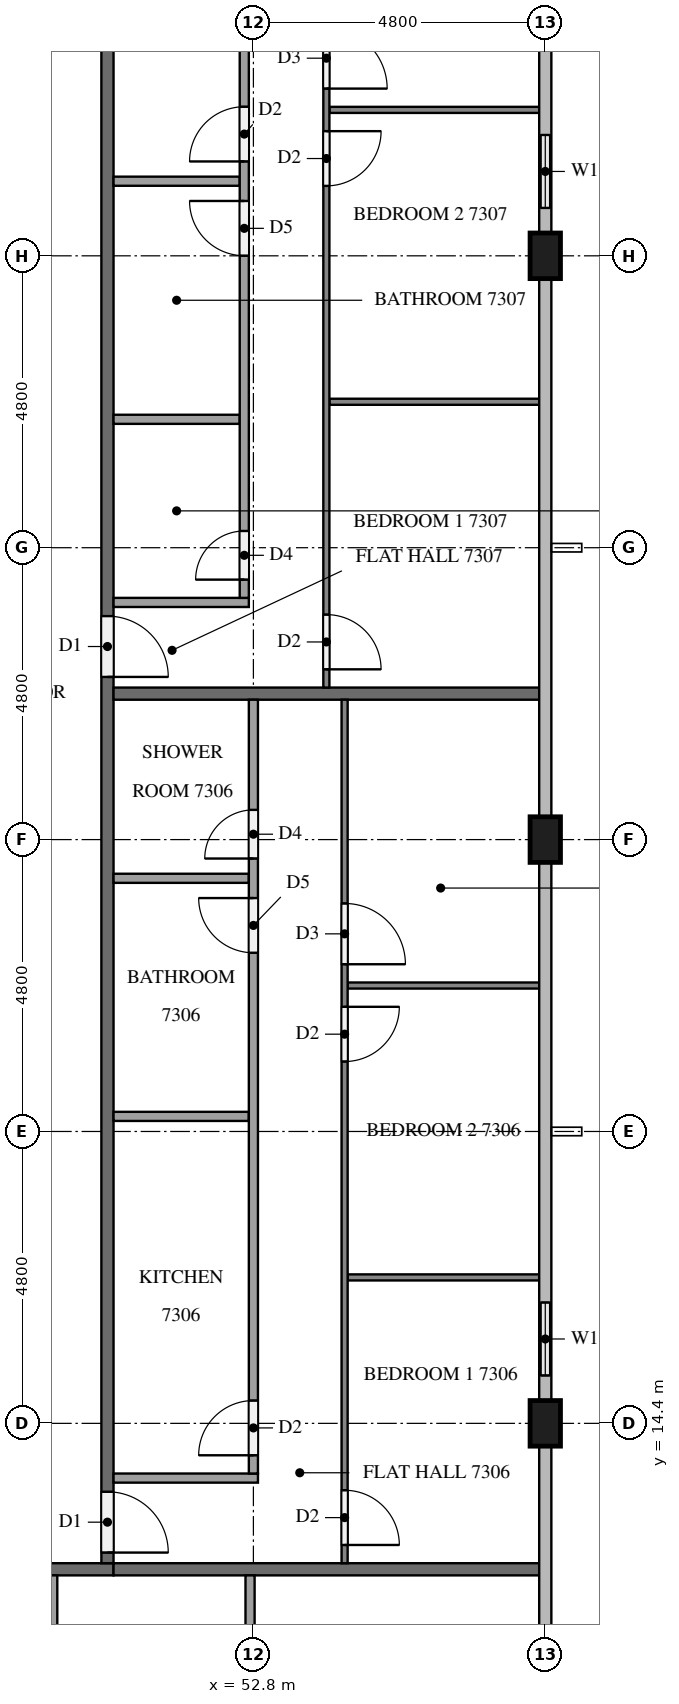
"""IFC4 building model, lengths in metres.
Left out: names, types, materials, properties, quantities, classifications, styles, units other than length and angle.
Written with IfcOpenShell. Run it as: python <this file> out.ifc"""

import sys

from ifc_helpers import new_model, si_unit, direction, frame, frame_2d, origin, origin_2d, place, context, subcontext, project, spatial, rectangle, extrude, element, fill, save


model = new_model("IFC4")
c1 = context("Model", 3, precision=1e-05, world=origin(), true_north=direction((0.0, 1.0)))
c2 = subcontext(c1, "Body", "Model", "MODEL_VIEW")
j1 = project(units=[si_unit("LENGTHUNIT", "METRE"), si_unit("PLANEANGLEUNIT", "RADIAN")], contexts=[c1])
p1 = place(None, origin())
s1 = spatial("IfcSite", under=j1, at=p1, CompositionType="ELEMENT")
p2 = place(p1, origin())
s2 = spatial("IfcBuilding", under=s1, at=p2, CompositionType="ELEMENT")
p3 = place(p2, frame((0.0, 0.0, 279.1)))
s3 = spatial("IfcBuildingStorey", under=s2, at=p3, CompositionType="ELEMENT", Elevation=279.1)
for number, where, z_axis, x_axis in (
    (1, (57.6, 14.4, 0.0), (0.0, 0.0, 1.0), (0.0, 1.0, 0.0)),
    (2, (57.6, 24.0, 0.0), (0.0, 0.0, 1.0), (0.0, 1.0, 0.0)),
    (3, (57.6, 33.6, 0.0), (0.0, 0.0, 1.0), (0.0, 1.0, 0.0)),
):
    element("IfcColumn", number, at=place(p3, frame(where, z_axis=z_axis, x_axis=x_axis)), inside=s3, PredefinedType="COLUMN", context=c2, shape_type="SweptSolid", body=[
        extrude(rectangle(XDim=0.75, YDim=0.5, at=origin_2d()), origin(), (0.0, 0.0, 1.0), 3.2),
    ])
p4 = place(p3, frame((57.6, 14.775, 0.0), z_axis=(0.0, 0.0, 1.0), x_axis=(0.0, 1.0, 0.0)))
e4 = element("IfcWall", 4, at=p4, inside=s3, PredefinedType="SOLIDWALL", context=c2, shape_type="SweptSolid", body=[
    extrude(rectangle(XDim=2.025, YDim=0.15, at=frame_2d((1.013, 0.0))), origin(), (0.0, 0.0, 1.0), 3.2),
])
p5 = place(p4, frame((0.413, 0.0, 0.9)))
e5 = element("IfcOpeningElement", 5, at=p5, cuts=e4, PredefinedType="OPENING", context=c2, shape_type="SweptSolid", body=[
    extrude(rectangle(XDim=1.2, YDim=1.4, at=frame_2d((0.6, 0.7))), frame((0.0, 0.085, 0.0), z_axis=(0.0, -1.0, 0.0), x_axis=(1.0, 0.0, 0.0)), (0.0, 0.0, 1.0), 0.17),
])
p6 = place(p3, frame((57.6, 33.975, 0.0), z_axis=(0.0, 0.0, 1.0), x_axis=(0.0, 1.0, 0.0)))
e6 = element("IfcWall", 6, at=p6, inside=s3, PredefinedType="SOLIDWALL", context=c2, shape_type="SweptSolid", body=[
    extrude(rectangle(XDim=2.025, YDim=0.15, at=frame_2d((1.012, 0.0))), origin(), (0.0, 0.0, 1.0), 3.2),
])
p7 = place(p6, frame((0.413, 0.0, 0.9)))
e7 = element("IfcOpeningElement", 7, at=p7, cuts=e6, PredefinedType="OPENING", context=c2, shape_type="SweptSolid", body=[
    extrude(rectangle(XDim=1.2, YDim=1.4, at=frame_2d((0.6, 0.7))), frame((0.0, 0.085, 0.0), z_axis=(0.0, -1.0, 0.0), x_axis=(1.0, 0.0, 0.0)), (0.0, 0.0, 1.0), 0.17),
])
p8 = place(p3, frame((50.5, 12.0, 0.0), z_axis=(0.0, 0.0, 1.0), x_axis=(-1.0, 0.0, 0.0)))
e8 = element("IfcWall", 8, at=p8, inside=s3, PredefinedType="PARTITIONING", context=c2, shape_type="SweptSolid", body=[
    extrude(rectangle(XDim=38.6, YDim=0.2, at=frame_2d((19.3, 0.0))), origin(), (0.0, 0.0, 1.0), 3.2),
])
p9 = place(p8, frame((36.375, 0.0, 0.0)))
e9 = element("IfcOpeningElement", 9, at=p9, cuts=e8, PredefinedType="OPENING", context=c2, shape_type="SweptSolid", body=[
    extrude(rectangle(XDim=1.0, YDim=2.1, at=frame_2d((0.5, 1.05))), frame((0.0, 0.11, 0.0), z_axis=(0.0, -1.0, 0.0), x_axis=(1.0, 0.0, 0.0)), (0.0, 0.0, 1.0), 0.22),
])
p10 = place(p8, frame((29.175, 0.0, 0.0)))
e10 = element("IfcOpeningElement", 10, at=p10, cuts=e8, PredefinedType="OPENING", context=c2, shape_type="SweptSolid", body=[
    extrude(rectangle(XDim=1.0, YDim=2.1, at=frame_2d((0.5, 1.05))), frame((0.0, 0.11, 0.0), z_axis=(0.0, -1.0, 0.0), x_axis=(1.0, 0.0, 0.0)), (0.0, 0.0, 1.0), 0.22),
])
p11 = place(p8, frame((27.625, 0.0, 0.0)))
e11 = element("IfcOpeningElement", 11, at=p11, cuts=e8, PredefinedType="OPENING", context=c2, shape_type="SweptSolid", body=[
    extrude(rectangle(XDim=1.0, YDim=2.1, at=frame_2d((0.5, 1.05))), frame((0.0, 0.11, 0.0), z_axis=(0.0, -1.0, 0.0), x_axis=(1.0, 0.0, 0.0)), (0.0, 0.0, 1.0), 0.22),
])
p12 = place(p8, frame((2.775, 0.0, 0.0)))
e12 = element("IfcOpeningElement", 12, at=p12, cuts=e8, PredefinedType="OPENING", context=c2, shape_type="SweptSolid", body=[
    extrude(rectangle(XDim=1.0, YDim=2.1, at=frame_2d((0.5, 1.05))), frame((0.0, 0.11, 0.0), z_axis=(0.0, -1.0, 0.0), x_axis=(1.0, 0.0, 0.0)), (0.0, 0.0, 1.0), 0.22),
])
p13 = place(p8, frame((1.225, 0.0, 0.0)))
e13 = element("IfcOpeningElement", 13, at=p13, cuts=e8, PredefinedType="OPENING", context=c2, shape_type="SweptSolid", body=[
    extrude(rectangle(XDim=1.0, YDim=2.1, at=frame_2d((0.5, 1.05))), frame((0.0, 0.11, 0.0), z_axis=(0.0, -1.0, 0.0), x_axis=(1.0, 0.0, 0.0)), (0.0, 0.0, 1.0), 0.22),
])
p14 = place(p3, frame((50.4, 40.7, 0.0), z_axis=(0.0, 0.0, 1.0), x_axis=(0.0, -1.0, 0.0)))
e14 = element("IfcWall", 14, at=p14, inside=s3, PredefinedType="PARTITIONING", context=c2, shape_type="SweptSolid", body=[
    extrude(rectangle(XDim=28.6, YDim=0.2, at=frame_2d((14.3, 0.0))), origin(), (0.0, 0.0, 1.0), 3.2),
])
p15 = place(p14, frame((27.425, 0.0, 0.0)))
e15 = element("IfcOpeningElement", 15, at=p15, cuts=e14, PredefinedType="OPENING", context=c2, shape_type="SweptSolid", body=[
    extrude(rectangle(XDim=1.0, YDim=2.1, at=frame_2d((0.5, 1.05))), frame((0.0, 0.11, 0.0), z_axis=(0.0, -1.0, 0.0), x_axis=(1.0, 0.0, 0.0)), (0.0, 0.0, 1.0), 0.22),
])
p16 = place(p14, frame((13.025, 0.0, 0.0)))
e16 = element("IfcOpeningElement", 16, at=p16, cuts=e14, PredefinedType="OPENING", context=c2, shape_type="SweptSolid", body=[
    extrude(rectangle(XDim=1.0, YDim=2.1, at=frame_2d((0.5, 1.05))), frame((0.0, 0.11, 0.0), z_axis=(0.0, -1.0, 0.0), x_axis=(1.0, 0.0, 0.0)), (0.0, 0.0, 1.0), 0.22),
])
for number, where, z_axis, x_axis in (
    (17, (50.5, 12.0, 0.0), (0.0, 0.0, 1.0), (1.0, 0.0, 0.0)),
    (18, (50.5, 26.4, 0.0), (0.0, 0.0, 1.0), (1.0, 0.0, 0.0)),
):
    element("IfcWall", number, at=place(p3, frame(where, z_axis=z_axis, x_axis=x_axis)), inside=s3, PredefinedType="PARTITIONING", context=c2, shape_type="SweptSolid", body=[
        extrude(rectangle(XDim=7.0, YDim=0.2, at=frame_2d((3.5, 0.0))), origin(), (0.0, 0.0, 1.0), 3.2),
    ])
p17 = place(p3, frame((52.745, 11.9, 0.0), z_axis=(0.0, 0.0, 1.0), x_axis=(0.0, -1.0, 0.0)))
e19 = element("IfcWall", 19, at=p17, inside=s3, PredefinedType="PARTITIONING", context=c2, shape_type="SweptSolid", body=[
    extrude(rectangle(XDim=3.575, YDim=0.15, at=frame_2d((1.788, 0.0))), origin(), (0.0, 0.0, 1.0), 3.2),
])
p18 = place(p3, frame((49.5, 11.9, 0.0), z_axis=(0.0, 0.0, 1.0), x_axis=(0.0, -1.0, 0.0)))
e20 = element("IfcWall", 20, at=p18, inside=s3, PredefinedType="PARTITIONING", context=c2, shape_type="SweptSolid", body=[
    extrude(rectangle(XDim=3.725, YDim=0.15, at=frame_2d((1.862, 0.0))), origin(), (0.0, 0.0, 1.0), 3.2),
])
for number, where, z_axis, x_axis in (
    (21, (54.35, 16.8, 0.0), (0.0, 0.0, 1.0), (1.0, 0.0, 0.0)),
    (22, (54.35, 21.6, 0.0), (0.0, 0.0, 1.0), (1.0, 0.0, 0.0)),
):
    element("IfcWall", number, at=place(p3, frame(where, z_axis=z_axis, x_axis=x_axis)), inside=s3, PredefinedType="PARTITIONING", context=c2, shape_type="SweptSolid", body=[
        extrude(rectangle(XDim=3.15, YDim=0.1, at=frame_2d((1.575, 0.0))), origin(), (0.0, 0.0, 1.0), 3.2),
    ])
p19 = place(p3, frame((54.3, 26.3, 0.0), z_axis=(0.0, 0.0, 1.0), x_axis=(0.0, -1.0, 0.0)))
e23 = element("IfcWall", 23, at=p19, inside=s3, PredefinedType="PARTITIONING", context=c2, shape_type="SweptSolid", body=[
    extrude(rectangle(XDim=14.2, YDim=0.1, at=frame_2d((7.1, 0.0))), origin(), (0.0, 0.0, 1.0), 3.2),
])
p20 = place(p19, frame((13.0, 0.0, 0.0)))
e24 = element("IfcOpeningElement", 24, at=p20, cuts=e23, PredefinedType="OPENING", context=c2, shape_type="SweptSolid", body=[
    extrude(rectangle(XDim=0.9, YDim=2.1, at=frame_2d((0.45, 1.05))), frame((0.0, 0.06, 0.0), z_axis=(0.0, -1.0, 0.0), x_axis=(1.0, 0.0, 0.0)), (0.0, 0.0, 1.0), 0.12),
])
p21 = place(p19, frame((5.05, 0.0, 0.0)))
e25 = element("IfcOpeningElement", 25, at=p21, cuts=e23, PredefinedType="OPENING", context=c2, shape_type="SweptSolid", body=[
    extrude(rectangle(XDim=0.9, YDim=2.1, at=frame_2d((0.45, 1.05))), frame((0.0, 0.06, 0.0), z_axis=(0.0, -1.0, 0.0), x_axis=(1.0, 0.0, 0.0)), (0.0, 0.0, 1.0), 0.12),
])
p22 = place(p19, frame((3.35, 0.0, 0.0)))
e26 = element("IfcOpeningElement", 26, at=p22, cuts=e23, PredefinedType="OPENING", context=c2, shape_type="SweptSolid", body=[
    extrude(rectangle(XDim=1.0, YDim=2.1, at=frame_2d((0.5, 1.05))), frame((0.0, 0.06, 0.0), z_axis=(0.0, -1.0, 0.0), x_axis=(1.0, 0.0, 0.0)), (0.0, 0.0, 1.0), 0.12),
])
for number, where, z_axis, x_axis in (
    (27, (50.5, 19.448, 0.0), (0.0, 0.0, 1.0), (1.0, 0.0, 0.0)),
    (28, (50.5, 23.364, 0.0), (0.0, 0.0, 1.0), (1.0, 0.0, 0.0)),
):
    element("IfcWall", number, at=place(p3, frame(where, z_axis=z_axis, x_axis=x_axis)), inside=s3, PredefinedType="PARTITIONING", context=c2, shape_type="SweptSolid", body=[
        extrude(rectangle(XDim=2.225, YDim=0.15, at=frame_2d((1.113, 0.0))), origin(), (0.0, 0.0, 1.0), 3.2),
    ])
p23 = place(p3, frame((50.5, 13.5, 0.0), z_axis=(0.0, 0.0, 1.0), x_axis=(1.0, 0.0, 0.0)))
e29 = element("IfcWall", 29, at=p23, inside=s3, PredefinedType="PARTITIONING", context=c2, shape_type="SweptSolid", body=[
    extrude(rectangle(XDim=2.375, YDim=0.15, at=frame_2d((1.188, 0.0))), origin(), (0.0, 0.0, 1.0), 3.2),
])
p24 = place(p3, frame((52.8, 13.575, 0.0), z_axis=(0.0, 0.0, 1.0), x_axis=(0.0, 1.0, 0.0)))
e30 = element("IfcWall", 30, at=p24, inside=s3, PredefinedType="PARTITIONING", context=c2, shape_type="SweptSolid", body=[
    extrude(rectangle(XDim=12.725, YDim=0.15, at=frame_2d((6.363, 0.0))), origin(), (0.0, 0.0, 1.0), 3.2),
])
p25 = place(p24, frame((0.3, 0.0, 0.0)))
e31 = element("IfcOpeningElement", 31, at=p25, cuts=e30, PredefinedType="OPENING", context=c2, shape_type="SweptSolid", body=[
    extrude(rectangle(XDim=0.9, YDim=2.1, at=frame_2d((0.45, 1.05))), frame((0.0, 0.085, 0.0), z_axis=(0.0, -1.0, 0.0), x_axis=(1.0, 0.0, 0.0)), (0.0, 0.0, 1.0), 0.17),
])
p26 = place(p24, frame((8.563, 0.0, 0.0)))
e32 = element("IfcOpeningElement", 32, at=p26, cuts=e30, PredefinedType="OPENING", context=c2, shape_type="SweptSolid", body=[
    extrude(rectangle(XDim=0.9, YDim=2.1, at=frame_2d((0.45, 1.05))), frame((0.0, 0.085, 0.0), z_axis=(0.0, -1.0, 0.0), x_axis=(1.0, 0.0, 0.0)), (0.0, 0.0, 1.0), 0.17),
])
p27 = place(p24, frame((10.114, 0.0, 0.0)))
e33 = element("IfcOpeningElement", 33, at=p27, cuts=e30, PredefinedType="OPENING", context=c2, shape_type="SweptSolid", body=[
    extrude(rectangle(XDim=0.8, YDim=2.1, at=frame_2d((0.4, 1.05))), frame((0.0, 0.085, 0.0), z_axis=(0.0, -1.0, 0.0), x_axis=(1.0, 0.0, 0.0)), (0.0, 0.0, 1.0), 0.17),
])
for number, where, z_axis, x_axis in (
    (34, (54.05, 31.2, 0.0), (0.0, 0.0, 1.0), (1.0, 0.0, 0.0)),
    (35, (54.05, 36.0, 0.0), (0.0, 0.0, 1.0), (1.0, 0.0, 0.0)),
):
    element("IfcWall", number, at=place(p3, frame(where, z_axis=z_axis, x_axis=x_axis)), inside=s3, PredefinedType="PARTITIONING", context=c2, shape_type="SweptSolid", body=[
        extrude(rectangle(XDim=3.45, YDim=0.1, at=frame_2d((1.725, 0.0))), origin(), (0.0, 0.0, 1.0), 3.2),
    ])
p28 = place(p3, frame((54.0, 40.7, 0.0), z_axis=(0.0, 0.0, 1.0), x_axis=(0.0, -1.0, 0.0)))
e36 = element("IfcWall", 36, at=p28, inside=s3, PredefinedType="PARTITIONING", context=c2, shape_type="SweptSolid", body=[
    extrude(rectangle(XDim=14.2, YDim=0.1, at=frame_2d((7.1, 0.0))), origin(), (0.0, 0.0, 1.0), 3.2),
])
p29 = place(p28, frame((13.0, 0.0, 0.0)))
e37 = element("IfcOpeningElement", 37, at=p29, cuts=e36, PredefinedType="OPENING", context=c2, shape_type="SweptSolid", body=[
    extrude(rectangle(XDim=0.9, YDim=2.1, at=frame_2d((0.45, 1.05))), frame((0.0, 0.06, 0.0), z_axis=(0.0, -1.0, 0.0), x_axis=(1.0, 0.0, 0.0)), (0.0, 0.0, 1.0), 0.12),
])
p30 = place(p28, frame((5.05, 0.0, 0.0)))
e38 = element("IfcOpeningElement", 38, at=p30, cuts=e36, PredefinedType="OPENING", context=c2, shape_type="SweptSolid", body=[
    extrude(rectangle(XDim=0.9, YDim=2.1, at=frame_2d((0.45, 1.05))), frame((0.0, 0.06, 0.0), z_axis=(0.0, -1.0, 0.0), x_axis=(1.0, 0.0, 0.0)), (0.0, 0.0, 1.0), 0.12),
])
p31 = place(p28, frame((3.35, 0.0, 0.0)))
e39 = element("IfcOpeningElement", 39, at=p31, cuts=e36, PredefinedType="OPENING", context=c2, shape_type="SweptSolid", body=[
    extrude(rectangle(XDim=1.0, YDim=2.1, at=frame_2d((0.5, 1.05))), frame((0.0, 0.06, 0.0), z_axis=(0.0, -1.0, 0.0), x_axis=(1.0, 0.0, 0.0)), (0.0, 0.0, 1.0), 0.12),
])
for number, where, z_axis, x_axis in (
    (40, (50.5, 30.912, 0.0), (0.0, 0.0, 1.0), (1.0, 0.0, 0.0)),
    (41, (50.5, 34.827, 0.0), (0.0, 0.0, 1.0), (1.0, 0.0, 0.0)),
):
    element("IfcWall", number, at=place(p3, frame(where, z_axis=z_axis, x_axis=x_axis)), inside=s3, PredefinedType="PARTITIONING", context=c2, shape_type="SweptSolid", body=[
        extrude(rectangle(XDim=2.075, YDim=0.15, at=frame_2d((1.038, 0.0))), origin(), (0.0, 0.0, 1.0), 3.2),
    ])
p32 = place(p3, frame((50.5, 27.9, 0.0), z_axis=(0.0, 0.0, 1.0), x_axis=(1.0, 0.0, 0.0)))
e42 = element("IfcWall", 42, at=p32, inside=s3, PredefinedType="PARTITIONING", context=c2, shape_type="SweptSolid", body=[
    extrude(rectangle(XDim=2.225, YDim=0.15, at=frame_2d((1.113, 0.0))), origin(), (0.0, 0.0, 1.0), 3.2),
])
p33 = place(p3, frame((52.65, 27.975, 0.0), z_axis=(0.0, 0.0, 1.0), x_axis=(0.0, 1.0, 0.0)))
e43 = element("IfcWall", 43, at=p33, inside=s3, PredefinedType="PARTITIONING", context=c2, shape_type="SweptSolid", body=[
    extrude(rectangle(XDim=12.725, YDim=0.15, at=frame_2d((6.362, 0.0))), origin(), (0.0, 0.0, 1.0), 3.2),
])
p34 = place(p33, frame((0.3, 0.0, 0.0)))
e44 = element("IfcOpeningElement", 44, at=p34, cuts=e43, PredefinedType="OPENING", context=c2, shape_type="SweptSolid", body=[
    extrude(rectangle(XDim=0.8, YDim=2.1, at=frame_2d((0.4, 1.05))), frame((0.0, 0.085, 0.0), z_axis=(0.0, -1.0, 0.0), x_axis=(1.0, 0.0, 0.0)), (0.0, 0.0, 1.0), 0.17),
])
p35 = place(p33, frame((5.627, 0.0, 0.0)))
e45 = element("IfcOpeningElement", 45, at=p35, cuts=e43, PredefinedType="OPENING", context=c2, shape_type="SweptSolid", body=[
    extrude(rectangle(XDim=0.9, YDim=2.1, at=frame_2d((0.45, 1.05))), frame((0.0, 0.085, 0.0), z_axis=(0.0, -1.0, 0.0), x_axis=(1.0, 0.0, 0.0)), (0.0, 0.0, 1.0), 0.17),
])
p36 = place(p33, frame((7.177, 0.0, 0.0)))
e46 = element("IfcOpeningElement", 46, at=p36, cuts=e43, PredefinedType="OPENING", context=c2, shape_type="SweptSolid", body=[
    extrude(rectangle(XDim=0.9, YDim=2.1, at=frame_2d((0.45, 1.05))), frame((0.0, 0.085, 0.0), z_axis=(0.0, -1.0, 0.0), x_axis=(1.0, 0.0, 0.0)), (0.0, 0.0, 1.0), 0.17),
])
p37 = place(p5, origin())
e47 = element("IfcWindow", 47, at=p37, inside=s3, PartitioningType="SINGLE_PANEL", PredefinedType="WINDOW", context=c2, shape_type="SweptSolid", body=[
    extrude(rectangle(XDim=1.2, YDim=1.4, at=frame_2d((0.6, 0.7))), frame((0.0, 0.03, 0.0), z_axis=(0.0, -1.0, 0.0), x_axis=(1.0, 0.0, 0.0)), (0.0, 0.0, 1.0), 0.06),
])
fill(e5, e47)
p38 = place(p7, origin())
e48 = element("IfcWindow", 48, at=p38, inside=s3, PartitioningType="SINGLE_PANEL", PredefinedType="WINDOW", context=c2, shape_type="SweptSolid", body=[
    extrude(rectangle(XDim=1.2, YDim=1.4, at=frame_2d((0.6, 0.7))), frame((0.0, 0.03, 0.0), z_axis=(0.0, -1.0, 0.0), x_axis=(1.0, 0.0, 0.0)), (0.0, 0.0, 1.0), 0.06),
])
fill(e7, e48)
p39 = place(p15, origin())
e49 = element("IfcDoor", 49, at=p39, inside=s3, OperationType="SINGLE_SWING_RIGHT", PredefinedType="DOOR", context=c2, shape_type="SweptSolid", body=[
    extrude(rectangle(XDim=1.0, YDim=2.1, at=frame_2d((0.5, 1.05))), frame((0.0, 0.025, 0.0), z_axis=(0.0, -1.0, 0.0), x_axis=(1.0, 0.0, 0.0)), (0.0, 0.0, 1.0), 0.05),
])
fill(e15, e49)
p40 = place(p16, origin())
e50 = element("IfcDoor", 50, at=p40, inside=s3, OperationType="SINGLE_SWING_RIGHT", PredefinedType="DOOR", context=c2, shape_type="SweptSolid", body=[
    extrude(rectangle(XDim=1.0, YDim=2.1, at=frame_2d((0.5, 1.05))), frame((0.0, 0.025, 0.0), z_axis=(0.0, -1.0, 0.0), x_axis=(1.0, 0.0, 0.0)), (0.0, 0.0, 1.0), 0.05),
])
fill(e16, e50)
p41 = place(p20, origin())
e51 = element("IfcDoor", 51, at=p41, inside=s3, OperationType="SINGLE_SWING_RIGHT", PredefinedType="DOOR", context=c2, shape_type="SweptSolid", body=[
    extrude(rectangle(XDim=0.9, YDim=2.1, at=frame_2d((0.45, 1.05))), frame((0.0, 0.025, 0.0), z_axis=(0.0, -1.0, 0.0), x_axis=(1.0, 0.0, 0.0)), (0.0, 0.0, 1.0), 0.05),
])
fill(e24, e51)
p42 = place(p21, origin())
e52 = element("IfcDoor", 52, at=p42, inside=s3, OperationType="SINGLE_SWING_LEFT", PredefinedType="DOOR", context=c2, shape_type="SweptSolid", body=[
    extrude(rectangle(XDim=0.9, YDim=2.1, at=frame_2d((0.45, 1.05))), frame((0.0, 0.025, 0.0), z_axis=(0.0, -1.0, 0.0), x_axis=(1.0, 0.0, 0.0)), (0.0, 0.0, 1.0), 0.05),
])
fill(e25, e52)
p43 = place(p22, origin())
e53 = element("IfcDoor", 53, at=p43, inside=s3, OperationType="SINGLE_SWING_RIGHT", PredefinedType="DOOR", context=c2, shape_type="SweptSolid", body=[
    extrude(rectangle(XDim=1.0, YDim=2.1, at=frame_2d((0.5, 1.05))), frame((0.0, 0.025, 0.0), z_axis=(0.0, -1.0, 0.0), x_axis=(1.0, 0.0, 0.0)), (0.0, 0.0, 1.0), 0.05),
])
fill(e26, e53)
p44 = place(p25, origin())
e54 = element("IfcDoor", 54, at=p44, inside=s3, OperationType="SINGLE_SWING_LEFT", PredefinedType="DOOR", context=c2, shape_type="SweptSolid", body=[
    extrude(rectangle(XDim=0.9, YDim=2.1, at=frame_2d((0.45, 1.05))), frame((0.0, 0.025, 0.0), z_axis=(0.0, -1.0, 0.0), x_axis=(1.0, 0.0, 0.0)), (0.0, 0.0, 1.0), 0.05),
])
fill(e31, e54)
p45 = place(p26, origin())
e55 = element("IfcDoor", 55, at=p45, inside=s3, OperationType="SINGLE_SWING_RIGHT", PredefinedType="DOOR", context=c2, shape_type="SweptSolid", body=[
    extrude(rectangle(XDim=0.9, YDim=2.1, at=frame_2d((0.45, 1.05))), frame((0.0, 0.025, 0.0), z_axis=(0.0, -1.0, 0.0), x_axis=(1.0, 0.0, 0.0)), (0.0, 0.0, 1.0), 0.05),
])
fill(e32, e55)
p46 = place(p27, origin())
e56 = element("IfcDoor", 56, at=p46, inside=s3, OperationType="SINGLE_SWING_LEFT", PredefinedType="DOOR", context=c2, shape_type="SweptSolid", body=[
    extrude(rectangle(XDim=0.8, YDim=2.1, at=frame_2d((0.4, 1.05))), frame((0.0, 0.025, 0.0), z_axis=(0.0, -1.0, 0.0), x_axis=(1.0, 0.0, 0.0)), (0.0, 0.0, 1.0), 0.05),
])
fill(e33, e56)
p47 = place(p29, origin())
e57 = element("IfcDoor", 57, at=p47, inside=s3, OperationType="SINGLE_SWING_RIGHT", PredefinedType="DOOR", context=c2, shape_type="SweptSolid", body=[
    extrude(rectangle(XDim=0.9, YDim=2.1, at=frame_2d((0.45, 1.05))), frame((0.0, 0.025, 0.0), z_axis=(0.0, -1.0, 0.0), x_axis=(1.0, 0.0, 0.0)), (0.0, 0.0, 1.0), 0.05),
])
fill(e37, e57)
p48 = place(p30, origin())
e58 = element("IfcDoor", 58, at=p48, inside=s3, OperationType="SINGLE_SWING_LEFT", PredefinedType="DOOR", context=c2, shape_type="SweptSolid", body=[
    extrude(rectangle(XDim=0.9, YDim=2.1, at=frame_2d((0.45, 1.05))), frame((0.0, 0.025, 0.0), z_axis=(0.0, -1.0, 0.0), x_axis=(1.0, 0.0, 0.0)), (0.0, 0.0, 1.0), 0.05),
])
fill(e38, e58)
p49 = place(p31, origin())
e59 = element("IfcDoor", 59, at=p49, inside=s3, OperationType="SINGLE_SWING_RIGHT", PredefinedType="DOOR", context=c2, shape_type="SweptSolid", body=[
    extrude(rectangle(XDim=1.0, YDim=2.1, at=frame_2d((0.5, 1.05))), frame((0.0, 0.025, 0.0), z_axis=(0.0, -1.0, 0.0), x_axis=(1.0, 0.0, 0.0)), (0.0, 0.0, 1.0), 0.05),
])
fill(e39, e59)
p50 = place(p34, origin())
e60 = element("IfcDoor", 60, at=p50, inside=s3, OperationType="SINGLE_SWING_LEFT", PredefinedType="DOOR", context=c2, shape_type="SweptSolid", body=[
    extrude(rectangle(XDim=0.8, YDim=2.1, at=frame_2d((0.4, 1.05))), frame((0.0, 0.025, 0.0), z_axis=(0.0, -1.0, 0.0), x_axis=(1.0, 0.0, 0.0)), (0.0, 0.0, 1.0), 0.05),
])
fill(e44, e60)
p51 = place(p35, origin())
e61 = element("IfcDoor", 61, at=p51, inside=s3, OperationType="SINGLE_SWING_RIGHT", PredefinedType="DOOR", context=c2, shape_type="SweptSolid", body=[
    extrude(rectangle(XDim=0.9, YDim=2.1, at=frame_2d((0.45, 1.05))), frame((0.0, 0.025, 0.0), z_axis=(0.0, -1.0, 0.0), x_axis=(1.0, 0.0, 0.0)), (0.0, 0.0, 1.0), 0.05),
])
fill(e45, e61)
p52 = place(p36, origin())
e62 = element("IfcDoor", 62, at=p52, inside=s3, OperationType="SINGLE_SWING_LEFT", PredefinedType="DOOR", context=c2, shape_type="SweptSolid", body=[
    extrude(rectangle(XDim=0.9, YDim=2.1, at=frame_2d((0.45, 1.05))), frame((0.0, 0.025, 0.0), z_axis=(0.0, -1.0, 0.0), x_axis=(1.0, 0.0, 0.0)), (0.0, 0.0, 1.0), 0.05),
])
fill(e46, e62)
save(model, sys.argv[1])
